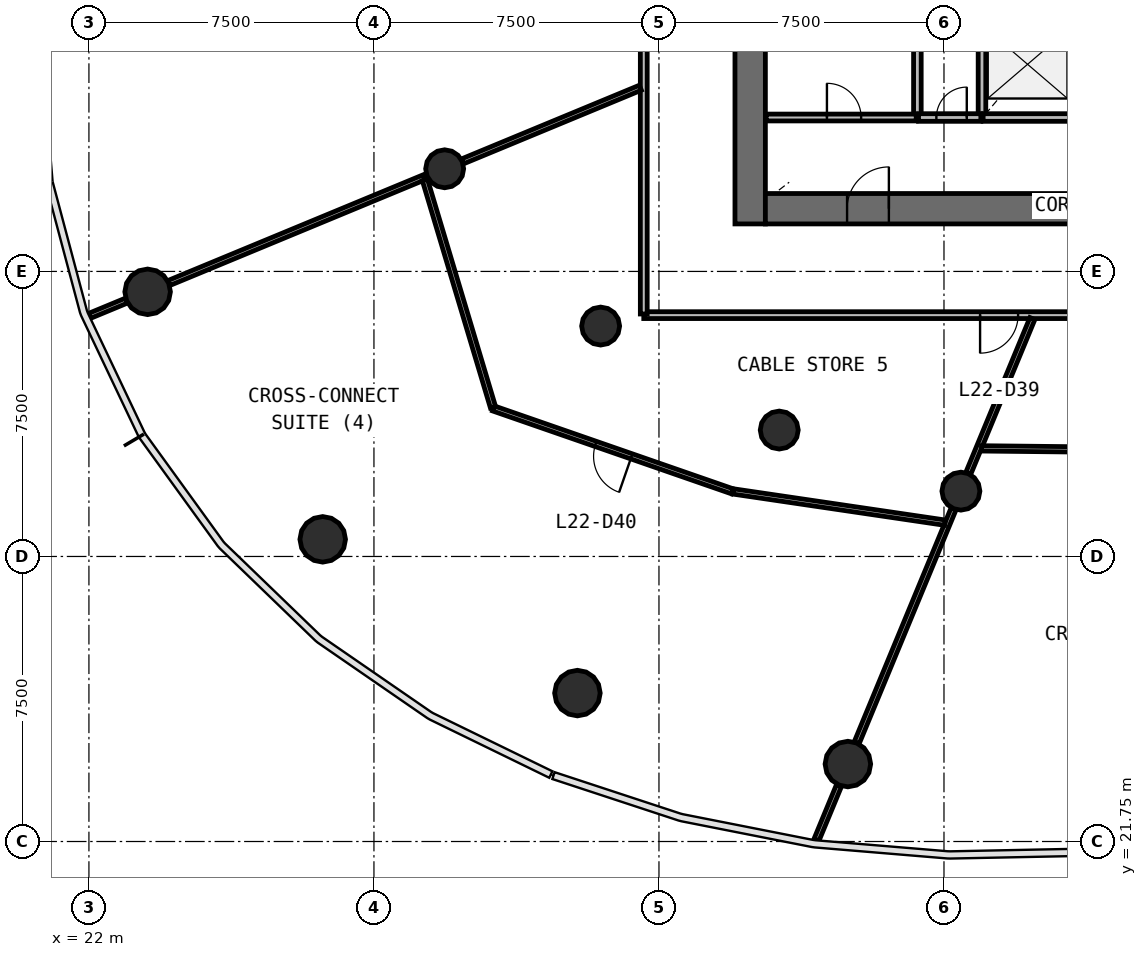
"""IFC4 building model, lengths in metres.
Left out: names, types, materials, properties, quantities, classifications, styles, units other than length and angle.
Written with IfcOpenShell. Run it as: python <this file> out.ifc"""

import sys

from ifc_helpers import new_model, si_unit, direction, frame, frame_2d, origin, origin_2d, place, context, subcontext, project, spatial, rectangle, circle, extrude, source, transform, mapped, element, fill, save


model = new_model("IFC4")
c1 = context("Model", 3, precision=1e-05, world=origin(), true_north=direction((0.0, 1.0)))
c2 = subcontext(c1, "Body", "Model", "MODEL_VIEW")
j1 = project(units=[si_unit("LENGTHUNIT", "METRE"), si_unit("PLANEANGLEUNIT", "RADIAN")], contexts=[c1])
p1 = place(None, origin())
s1 = spatial("IfcSite", under=j1, at=p1, CompositionType="ELEMENT")
p2 = place(p1, origin())
s2 = spatial("IfcBuilding", under=s1, at=p2, CompositionType="ELEMENT")
p3 = place(p2, frame((0.0, 0.0, 96.2)))
s3 = spatial("IfcBuildingStorey", under=s2, at=p3, CompositionType="ELEMENT", Elevation=96.2)
p4 = place(p3, frame((39.4, 58.0, 0.0), z_axis=(0.0, 0.0, 1.0), x_axis=(0.0, -1.0, 0.0)))
e1 = element("IfcWall", 1, at=p4, inside=s3, PredefinedType="SHEAR", context=c2, shape_type="SweptSolid", body=[
    extrude(rectangle(XDim=20.0, YDim=0.8, at=frame_2d((10.0, 0.0))), origin(), (0.0, 0.0, 1.0), 4.1),
])
p5 = place(p4, frame((9.1, 0.0, 0.0)))
e2 = element("IfcOpeningElement", 2, at=p5, cuts=e1, PredefinedType="OPENING", context=c2, shape_type="SweptSolid", body=[
    extrude(rectangle(XDim=1.8, YDim=2.1, at=frame_2d((0.9, 1.05))), frame((0.0, 0.41, 0.0), z_axis=(0.0, -1.0, 0.0), x_axis=(1.0, 0.0, 0.0)), (0.0, 0.0, 1.0), 0.82),
])
p6 = place(p3, frame((39.8, 38.4, 0.0), z_axis=(0.0, 0.0, 1.0), x_axis=(1.0, 0.0, 0.0)))
e3 = element("IfcWall", 3, at=p6, inside=s3, PredefinedType="SHEAR", context=c2, shape_type="SweptSolid", body=[
    extrude(rectangle(XDim=24.4, YDim=0.8, at=frame_2d((12.2, 0.0))), origin(), (0.0, 0.0, 1.0), 4.1),
])
p7 = place(p6, frame((21.65, 0.0, 0.0)))
e4 = element("IfcOpeningElement", 4, at=p7, cuts=e3, PredefinedType="OPENING", context=c2, shape_type="SweptSolid", body=[
    extrude(rectangle(XDim=1.1, YDim=2.1, at=frame_2d((0.55, 1.05))), frame((0.0, 0.41, 0.0), z_axis=(0.0, -1.0, 0.0), x_axis=(1.0, 0.0, 0.0)), (0.0, 0.0, 1.0), 0.82),
])
p8 = place(p6, frame((2.15, 0.0, 0.0)))
e5 = element("IfcOpeningElement", 5, at=p8, cuts=e3, PredefinedType="OPENING", context=c2, shape_type="SweptSolid", body=[
    extrude(rectangle(XDim=1.1, YDim=2.1, at=frame_2d((0.55, 1.05))), frame((0.0, 0.41, 0.0), z_axis=(0.0, -1.0, 0.0), x_axis=(1.0, 0.0, 0.0)), (0.0, 0.0, 1.0), 0.82),
])
m1 = source(origin(), c2, "Body", "SweptSolid", [
    extrude(circle(Radius=0.6, at=origin_2d()), origin(), (0.0, 0.0, 1.0), 4.1),
])
for number, where, z_axis, x_axis in (
    (6, (23.544, 36.213, 0.0), (0.0, 0.0, 1.0), (1.0, 0.0, 0.0)),
    (7, (28.152, 29.701, 0.0), (0.0, 0.0, 1.0), (1.0, 0.0, 0.0)),
    (8, (34.854, 25.655, 0.0), (0.0, 0.0, 1.0), (1.0, 0.0, 0.0)),
    (9, (41.971, 23.788, 0.0), (0.0, 0.0, 1.0), (1.0, 0.0, 0.0)),
):
    element("IfcColumn", number, at=place(p3, frame(where, z_axis=z_axis, x_axis=x_axis)), inside=s3, PredefinedType="COLUMN", context=c2, shape_type="MappedRepresentation", body=[
        mapped(m1, transform((0.0, 0.0, 0.0), scale=1.0)),
    ])
m2 = source(origin(), c2, "Body", "SweptSolid", [
    extrude(circle(Radius=0.5, at=origin_2d()), origin(), (0.0, 0.0, 1.0), 4.1),
])
for number, where, z_axis, x_axis in (
    (10, (31.361, 39.451, 0.0), (0.0, 0.0, 1.0), (1.0, 0.0, 0.0)),
    (11, (35.465, 35.312, 0.0), (0.0, 0.0, 1.0), (1.0, 0.0, 0.0)),
    (12, (40.165, 32.576, 0.0), (0.0, 0.0, 1.0), (1.0, 0.0, 0.0)),
    (13, (44.945, 30.969, 0.0), (0.0, 0.0, 1.0), (1.0, 0.0, 0.0)),
):
    element("IfcColumn", number, at=place(p3, frame(where, z_axis=z_axis, x_axis=x_axis)), inside=s3, PredefinedType="COLUMN", context=c2, shape_type="MappedRepresentation", body=[
        mapped(m2, transform((0.0, 0.0, 0.0), scale=1.0)),
    ])
for number, where, z_axis, x_axis in (
    (14, (43.8, 43.6, 0.0), (0.0, 0.0, 1.0), (0.0, -1.0, 0.0)),
    (15, (45.5, 43.6, 0.0), (0.0, 0.0, 1.0), (0.0, -1.0, 0.0)),
):
    element("IfcWall", number, at=place(p3, frame(where, z_axis=z_axis, x_axis=x_axis)), inside=s3, PredefinedType="SOLIDWALL", context=c2, shape_type="SweptSolid", body=[
        extrude(rectangle(XDim=2.8, YDim=0.2, at=frame_2d((1.4, 0.0))), origin(), (0.0, 0.0, 1.0), 3.7),
    ])
p9 = place(p3, frame((45.53, 40.8, 0.0), z_axis=(0.0, 0.0, 1.0), x_axis=(1.0, 0.0, 0.0)))
e16 = element("IfcWall", 16, at=p9, inside=s3, PredefinedType="SOLIDWALL", context=c2, shape_type="SweptSolid", body=[
    extrude(rectangle(XDim=2.34, YDim=0.2, at=frame_2d((1.17, 0.0))), origin(), (0.0, 0.0, 1.0), 3.7),
])
p10 = place(p3, frame((43.83, 40.8, 0.0), z_axis=(0.0, 0.0, 1.0), x_axis=(1.0, 0.0, 0.0)))
e17 = element("IfcWall", 17, at=p10, inside=s3, PredefinedType="SOLIDWALL", context=c2, shape_type="SweptSolid", body=[
    extrude(rectangle(XDim=1.64, YDim=0.2, at=frame_2d((0.82, 0.0))), origin(), (0.0, 0.0, 1.0), 3.7),
])
p11 = place(p10, frame((0.47, 0.0, 0.0)))
e18 = element("IfcOpeningElement", 18, at=p11, cuts=e17, PredefinedType="OPENING", context=c2, shape_type="SweptSolid", body=[
    extrude(rectangle(XDim=0.8, YDim=2.1, at=frame_2d((0.4, 1.05))), frame((0.0, 0.11, 0.0), z_axis=(0.0, -1.0, 0.0), x_axis=(1.0, 0.0, 0.0)), (0.0, 0.0, 1.0), 0.22),
])
p12 = place(p3, frame((67.4, 35.6, 0.0), z_axis=(0.0, 0.0, 1.0), x_axis=(-1.0, 0.0, 0.0)))
e19 = element("IfcWall", 19, at=p12, inside=s3, PredefinedType="PARTITIONING", context=c2, shape_type="SweptSolid", body=[
    extrude(rectangle(XDim=30.8, YDim=0.18, at=frame_2d((15.4, 0.0))), origin(), (0.0, 0.0, 1.0), 2.9),
])
p13 = place(p12, frame((9.05, 0.0, 0.0)))
e20 = element("IfcOpeningElement", 20, at=p13, cuts=e19, PredefinedType="OPENING", context=c2, shape_type="SweptSolid", body=[
    extrude(rectangle(XDim=0.9, YDim=2.1, at=frame_2d((0.45, 1.05))), frame((0.0, 0.1, 0.0), z_axis=(0.0, -1.0, 0.0), x_axis=(1.0, 0.0, 0.0)), (0.0, 0.0, 1.0), 0.2),
])
p14 = place(p12, frame((6.05, 0.0, 0.0)))
e21 = element("IfcOpeningElement", 21, at=p14, cuts=e19, PredefinedType="OPENING", context=c2, shape_type="SweptSolid", body=[
    extrude(rectangle(XDim=0.9, YDim=2.1, at=frame_2d((0.45, 1.05))), frame((0.0, 0.1, 0.0), z_axis=(0.0, -1.0, 0.0), x_axis=(1.0, 0.0, 0.0)), (0.0, 0.0, 1.0), 0.2),
])
p15 = place(p12, frame((2.45, 0.0, 0.0)))
e22 = element("IfcOpeningElement", 22, at=p15, cuts=e19, PredefinedType="OPENING", context=c2, shape_type="SweptSolid", body=[
    extrude(rectangle(XDim=0.9, YDim=2.1, at=frame_2d((0.45, 1.05))), frame((0.0, 0.1, 0.0), z_axis=(0.0, -1.0, 0.0), x_axis=(1.0, 0.0, 0.0)), (0.0, 0.0, 1.0), 0.2),
])
p16 = place(p12, frame((20.95, 0.0, 0.0)))
e23 = element("IfcOpeningElement", 23, at=p16, cuts=e19, PredefinedType="OPENING", context=c2, shape_type="SweptSolid", body=[
    extrude(rectangle(XDim=1.0, YDim=2.1, at=frame_2d((0.5, 1.05))), frame((0.0, 0.1, 0.0), z_axis=(0.0, -1.0, 0.0), x_axis=(1.0, 0.0, 0.0)), (0.0, 0.0, 1.0), 0.2),
])
p17 = place(p12, frame((14.95, 0.0, 0.0)))
e24 = element("IfcOpeningElement", 24, at=p17, cuts=e19, PredefinedType="OPENING", context=c2, shape_type="SweptSolid", body=[
    extrude(rectangle(XDim=1.0, YDim=2.1, at=frame_2d((0.5, 1.05))), frame((0.0, 0.1, 0.0), z_axis=(0.0, -1.0, 0.0), x_axis=(1.0, 0.0, 0.0)), (0.0, 0.0, 1.0), 0.2),
])
p18 = place(p3, frame((36.6, 35.63, 0.0), z_axis=(0.0, 0.0, 1.0), x_axis=(0.0, 1.0, 0.0)))
e25 = element("IfcWall", 25, at=p18, inside=s3, PredefinedType="PARTITIONING", context=c2, shape_type="SweptSolid", body=[
    extrude(rectangle(XDim=23.583, YDim=0.18, at=frame_2d((11.791, 0.0))), origin(), (0.0, 0.0, 1.0), 2.9),
])
p19 = place(p18, frame((14.732, 0.0, 0.0)))
e26 = element("IfcOpeningElement", 26, at=p19, cuts=e25, PredefinedType="OPENING", context=c2, shape_type="SweptSolid", body=[
    extrude(rectangle(XDim=1.0, YDim=2.1, at=frame_2d((0.5, 1.05))), frame((0.0, 0.1, 0.0), z_axis=(0.0, -1.0, 0.0), x_axis=(1.0, 0.0, 0.0)), (0.0, 0.0, 1.0), 0.2),
])
p20 = place(p18, frame((11.333, 0.0, 0.0)))
e27 = element("IfcOpeningElement", 27, at=p20, cuts=e25, PredefinedType="OPENING", context=c2, shape_type="SweptSolid", body=[
    extrude(rectangle(XDim=1.0, YDim=2.1, at=frame_2d((0.5, 1.05))), frame((0.0, 0.1, 0.0), z_axis=(0.0, -1.0, 0.0), x_axis=(1.0, 0.0, 0.0)), (0.0, 0.0, 1.0), 0.2),
])
p21 = place(p3, frame((39.82, 40.8, 0.0), z_axis=(0.0, 0.0, 1.0), x_axis=(1.0, 0.0, 0.0)))
e28 = element("IfcWall", 28, at=p21, inside=s3, PredefinedType="PARTITIONING", context=c2, shape_type="SweptSolid", body=[
    extrude(rectangle(XDim=3.95, YDim=0.18, at=frame_2d((1.975, 0.0))), origin(), (0.0, 0.0, 1.0), 3.7),
])
p22 = place(p21, frame((1.6, 0.0, 0.0)))
e29 = element("IfcOpeningElement", 29, at=p22, cuts=e28, PredefinedType="OPENING", context=c2, shape_type="SweptSolid", body=[
    extrude(rectangle(XDim=0.9, YDim=2.1, at=frame_2d((0.45, 1.05))), frame((0.0, 0.1, 0.0), z_axis=(0.0, -1.0, 0.0), x_axis=(1.0, 0.0, 0.0)), (0.0, 0.0, 1.0), 0.2),
])
p23 = place(p3, frame((30.82, 39.227, 0.0), z_axis=(0.0, 0.0, 1.0), x_axis=(-0.923877674765, -0.382687917331, 0.0)))
e30 = element("IfcWall", 30, at=p23, inside=s3, PredefinedType="PARTITIONING", context=c2, shape_type="SweptSolid", body=[
    extrude(rectangle(XDim=7.27, YDim=0.14, at=frame_2d((3.635, 0.0))), origin(), (0.0, 0.0, 1.0), 2.9),
])
p24 = place(p3, frame((42.202, 24.347, 0.0), z_axis=(0.0, 0.0, 1.0), x_axis=(0.382696989205, 0.923873916968, 0.0)))
e31 = element("IfcWall", 31, at=p24, inside=s3, PredefinedType="PARTITIONING", context=c2, shape_type="SweptSolid", body=[
    extrude(rectangle(XDim=6.663, YDim=0.14, at=frame_2d((3.332, 0.0))), origin(), (0.0, 0.0, 1.0), 2.9),
])
p25 = place(p3, frame((38.928, 30.965, 0.0), z_axis=(0.0, 0.0, 1.0), x_axis=(-0.944752901996, 0.327783395201, 0.0)))
e32 = element("IfcWall", 32, at=p25, inside=s3, PredefinedType="PARTITIONING", context=c2, shape_type="SweptSolid", body=[
    extrude(rectangle(XDim=6.654, YDim=0.14, at=frame_2d((3.327, 0.0))), origin(), (0.0, 0.0, 1.0), 2.9),
])
p26 = place(p25, frame((2.804, 0.0, 0.0)))
e33 = element("IfcOpeningElement", 33, at=p26, cuts=e32, PredefinedType="OPENING", context=c2, shape_type="SweptSolid", body=[
    extrude(rectangle(XDim=1.0, YDim=2.1, at=frame_2d((0.5, 1.05))), frame((0.0, 0.08, 0.0), z_axis=(0.0, -1.0, 0.0), x_axis=(1.0, 0.0, 0.0)), (0.0, 0.0, 1.0), 0.16),
])
p27 = place(p3, frame((30.841, 39.16, 0.0), z_axis=(0.0, 0.0, 1.0), x_axis=(0.286946329696, -0.957946660245, 0.0)))
e34 = element("IfcWall", 34, at=p27, inside=s3, PredefinedType="PARTITIONING", context=c2, shape_type="SweptSolid", body=[
    extrude(rectangle(XDim=6.248, YDim=0.14, at=frame_2d((3.124, 0.0))), origin(), (0.0, 0.0, 1.0), 2.9),
])
p28 = place(p3, frame((38.958, 30.96, 0.0), z_axis=(0.0, 0.0, 1.0), x_axis=(0.989308018388, -0.145841162756, 0.0)))
e35 = element("IfcWall", 35, at=p28, inside=s3, PredefinedType="PARTITIONING", context=c2, shape_type="SweptSolid", body=[
    extrude(rectangle(XDim=5.628, YDim=0.14, at=frame_2d((2.814, 0.0))), origin(), (0.0, 0.0, 1.0), 2.9),
])
p29 = place(p3, frame((36.51, 41.584, 0.0), z_axis=(0.0, 0.0, 1.0), x_axis=(-0.923890025086, -0.382658100067, 0.0)))
e36 = element("IfcWall", 36, at=p29, inside=s3, PredefinedType="PARTITIONING", context=c2, shape_type="SweptSolid", body=[
    extrude(rectangle(XDim=5.068, YDim=0.14, at=frame_2d((2.534, 0.0))), origin(), (0.0, 0.0, 1.0), 2.9),
])
p30 = place(p3, frame((45.139, 31.435, 0.0), z_axis=(0.0, 0.0, 1.0), x_axis=(0.382672831764, 0.923883923353, 0.0)))
e37 = element("IfcWall", 37, at=p30, inside=s3, PredefinedType="PARTITIONING", context=c2, shape_type="SweptSolid", body=[
    extrude(rectangle(XDim=4.41, YDim=0.14, at=frame_2d((2.205, 0.0))), origin(), (0.0, 0.0, 1.0), 2.9),
])
p31 = place(p3, frame((45.487, 32.094, 0.0), z_axis=(0.0, 0.0, 1.0), x_axis=(0.999942985282, -0.010678304441, 0.0)))
e38 = element("IfcWall", 38, at=p31, inside=s3, PredefinedType="PARTITIONING", context=c2, shape_type="SweptSolid", body=[
    extrude(rectangle(XDim=4.413, YDim=0.14, at=frame_2d((2.206, 0.0))), origin(), (0.0, 0.0, 1.0), 2.9),
])
p32 = place(p3, frame((41.74, 23.229, 0.0), z_axis=(0.0, 0.0, 1.0), x_axis=(-0.38270777603, -0.923869448659, 0.0)))
e39 = element("IfcWall", 39, at=p32, inside=s3, PredefinedType="PARTITIONING", context=c2, shape_type="SweptSolid", body=[
    extrude(rectangle(XDim=1.555, YDim=0.14, at=frame_2d((0.777, 0.0))), origin(), (0.0, 0.0, 1.0), 2.9),
])
p33 = place(p3, frame((22.986, 35.982, 0.0), z_axis=(0.0, 0.0, 1.0), x_axis=(-0.923912211219, -0.382604529457, 0.0)))
e40 = element("IfcWall", 40, at=p33, inside=s3, PredefinedType="PARTITIONING", context=c2, shape_type="SweptSolid", body=[
    extrude(rectangle(XDim=1.052, YDim=0.14, at=frame_2d((0.526, 0.0))), origin(), (0.0, 0.0, 1.0), 2.9),
])
m3 = source(origin(), c2, "Body", "SweptSolid", [
    extrude(rectangle(XDim=0.8, YDim=2.1, at=frame_2d((0.4, 1.05))), frame((0.0, 0.025, 0.0), z_axis=(0.0, -1.0, 0.0), x_axis=(1.0, 0.0, 0.0)), (0.0, 0.0, 1.0), 0.05),
])
p34 = place(p11, origin())
e41 = element("IfcDoor", 41, at=p34, inside=s3, OperationType="SINGLE_SWING_RIGHT", PredefinedType="DOOR", context=c2, shape_type="MappedRepresentation", body=[
    mapped(m3, transform((0.0, 0.0, 0.0), scale=1.0)),
])
fill(e18, e41)
m4 = source(origin(), c2, "Body", "SweptSolid", [
    extrude(rectangle(XDim=1.1, YDim=2.1, at=frame_2d((0.55, 1.05))), frame((0.0, 0.025, 0.0), z_axis=(0.0, -1.0, 0.0), x_axis=(1.0, 0.0, 0.0)), (0.0, 0.0, 1.0), 0.05),
])
p35 = place(p8, origin())
e42 = element("IfcDoor", 42, at=p35, inside=s3, OperationType="SINGLE_SWING_RIGHT", PredefinedType="DOOR", context=c2, shape_type="MappedRepresentation", body=[
    mapped(m4, transform((0.0, 0.0, 0.0), scale=1.0)),
])
fill(e5, e42)
m5 = source(origin(), c2, "Body", "SweptSolid", [
    extrude(rectangle(XDim=1.0, YDim=2.1, at=frame_2d((0.5, 1.05))), frame((0.0, 0.025, 0.0), z_axis=(0.0, -1.0, 0.0), x_axis=(1.0, 0.0, 0.0)), (0.0, 0.0, 1.0), 0.05),
])
p36 = place(p16, origin())
e43 = element("IfcDoor", 43, at=p36, inside=s3, OperationType="SINGLE_SWING_RIGHT", PredefinedType="DOOR", context=c2, shape_type="MappedRepresentation", body=[
    mapped(m5, transform((0.0, 0.0, 0.0), scale=1.0)),
])
fill(e23, e43)
p37 = place(p26, origin())
e44 = element("IfcDoor", 44, at=p37, inside=s3, OperationType="SINGLE_SWING_LEFT", PredefinedType="DOOR", context=c2, shape_type="MappedRepresentation", body=[
    mapped(m5, transform((0.0, 0.0, 0.0), scale=1.0)),
])
fill(e33, e44)
m6 = source(origin(), c2, "Body", "SweptSolid", [
    extrude(rectangle(XDim=0.9, YDim=2.1, at=frame_2d((0.45, 1.05))), frame((0.0, 0.025, 0.0), z_axis=(0.0, -1.0, 0.0), x_axis=(1.0, 0.0, 0.0)), (0.0, 0.0, 1.0), 0.05),
])
p38 = place(p22, origin())
e45 = element("IfcDoor", 45, at=p38, inside=s3, OperationType="SINGLE_SWING_LEFT", PredefinedType="DOOR", context=c2, shape_type="MappedRepresentation", body=[
    mapped(m6, transform((0.0, 0.0, 0.0), scale=1.0)),
])
fill(e29, e45)
save(model, sys.argv[1])
